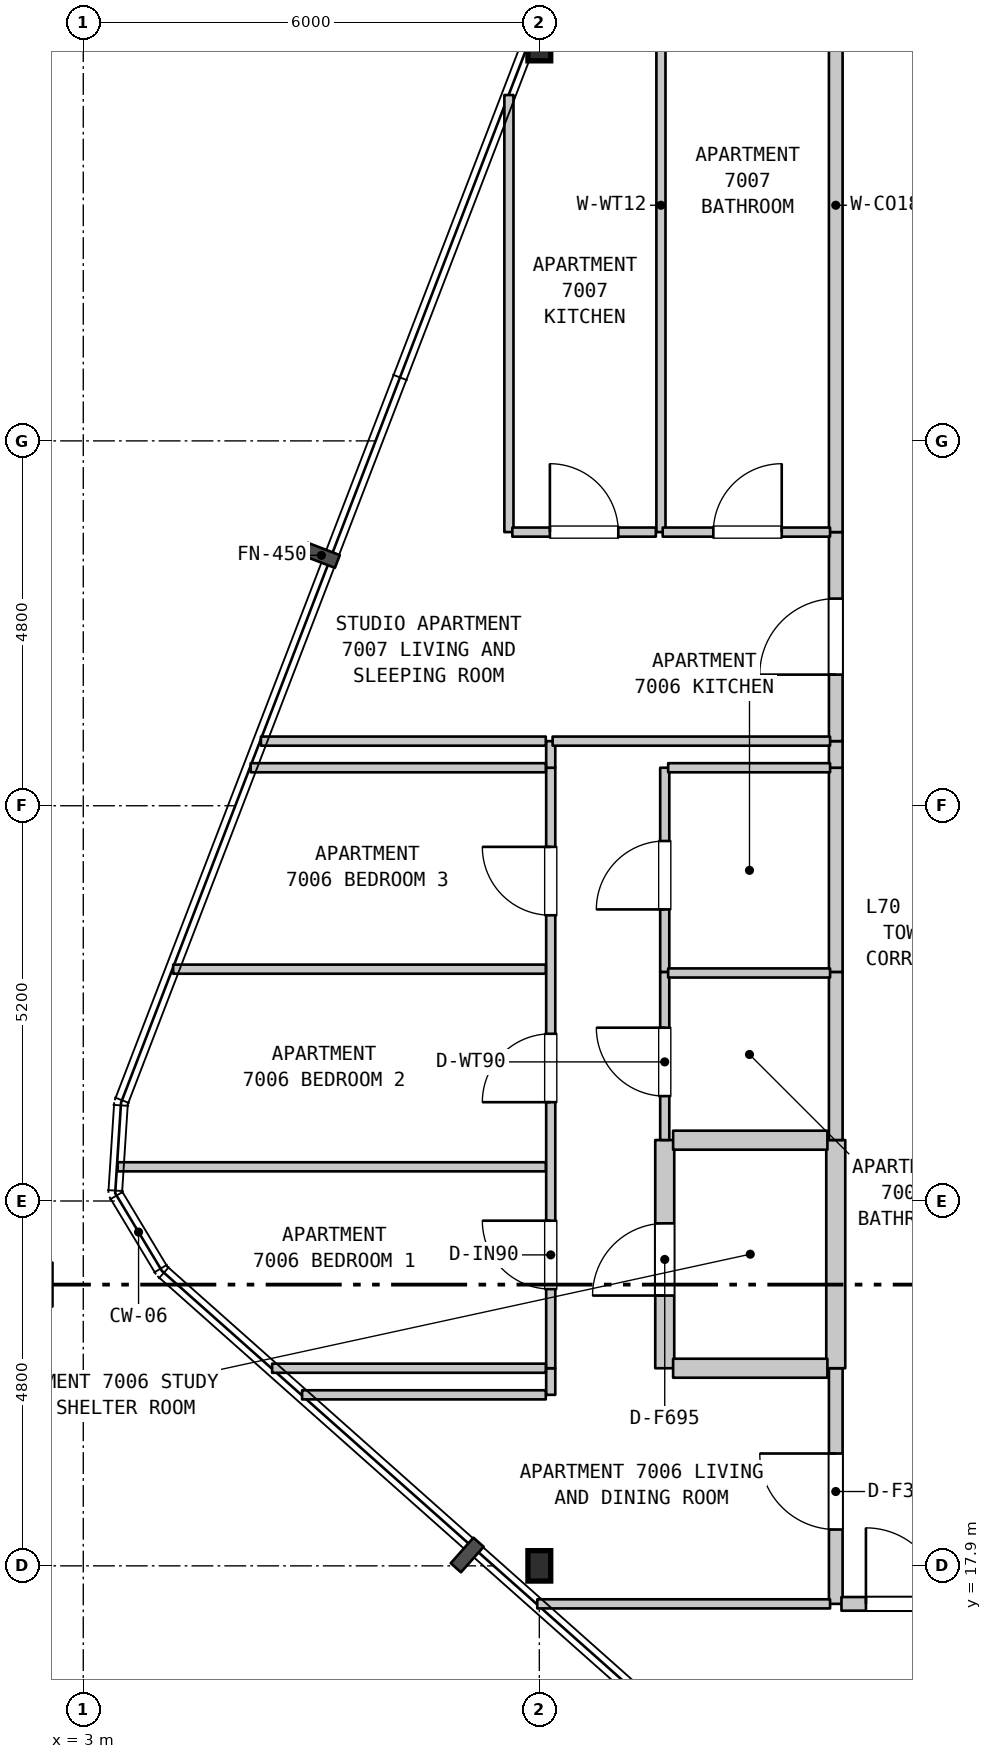
"""IFC4 building model, lengths in metres.
Left out: names, types, materials, properties, quantities, classifications, styles, units other than length and angle.
Written with IfcOpenShell. Run it as: python <this file> out.ifc"""

import sys

from ifc_helpers import new_model, si_unit, direction, frame, frame_2d, origin, origin_2d, place, context, subcontext, project, spatial, rectangle, i_section, extrude, element, fill, save


model = new_model("IFC4")
c1 = context("Model", 3, precision=1e-05, world=origin(), true_north=direction((0.0, 1.0)))
c2 = subcontext(c1, "Body", "Model", "MODEL_VIEW")
j1 = project(units=[si_unit("LENGTHUNIT", "METRE"), si_unit("PLANEANGLEUNIT", "RADIAN")], contexts=[c1])
p1 = place(None, origin())
s1 = spatial("IfcSite", under=j1, at=p1, CompositionType="ELEMENT")
p2 = place(p1, origin())
s2 = spatial("IfcBuilding", under=s1, at=p2, CompositionType="ELEMENT")
p3 = place(p2, frame((0.0, 0.0, 280.6)))
s3 = spatial("IfcBuildingStorey", under=s2, at=p3, CompositionType="ELEMENT", Elevation=280.6)
for number, where, z_axis, x_axis in (
    (1, (9.0, 17.9, 0.0), (0.0, 0.0, 1.0), (1.0, 0.0, 0.0)),
    (2, (9.0, 37.9, 0.0), (0.0, 0.0, 1.0), (1.0, 0.0, 0.0)),
):
    element("IfcColumn", number, at=place(p3, frame(where, z_axis=z_axis, x_axis=x_axis)), inside=s3, PredefinedType="COLUMN", context=c2, shape_type="SweptSolid", body=[
        extrude(i_section(OverallWidth=0.3, OverallDepth=0.4, WebThickness=0.013, FlangeThickness=0.024, FilletRadius=0.027, at=origin_2d()), origin(), (0.0, 0.0, 1.0), 3.7),
    ])
p4 = place(p3, frame((8.6, 31.5, 0.0), z_axis=(0.0, 0.0, 1.0), x_axis=(0.0, 1.0, 0.0)))
e3 = element("IfcWall", 3, at=p4, inside=s3, PredefinedType="PARTITIONING", context=c2, shape_type="SweptSolid", body=[
    extrude(rectangle(XDim=5.75, YDim=0.12, at=frame_2d((2.875, 0.0))), origin(), (0.0, 0.0, 1.0), 3.39),
])
p5 = place(p3, frame((9.15, 20.15, 0.0), z_axis=(0.0, 0.0, 1.0), x_axis=(0.0, 1.0, 0.0)))
e4 = element("IfcWall", 4, at=p5, inside=s3, PredefinedType="PARTITIONING", context=c2, shape_type="SweptSolid", body=[
    extrude(rectangle(XDim=0.35, YDim=0.12, at=frame_2d((0.175, 0.0))), origin(), (0.0, 0.0, 1.0), 3.39),
])
p6 = place(p3, frame((9.15, 20.5, 0.0), z_axis=(0.0, 0.0, 1.0), x_axis=(0.0, 1.0, 0.0)))
e5 = element("IfcWall", 5, at=p6, inside=s3, PredefinedType="PARTITIONING", context=c2, shape_type="SweptSolid", body=[
    extrude(rectangle(XDim=7.9, YDim=0.12, at=frame_2d((3.95, 0.0))), origin(), (0.0, 0.0, 1.0), 2.79),
])
p7 = place(p6, frame((1.041, 0.0, 0.0)))
e6 = element("IfcOpeningElement", 6, at=p7, cuts=e5, PredefinedType="OPENING", context=c2, shape_type="SweptSolid", body=[
    extrude(rectangle(XDim=0.9, YDim=2.15, at=frame_2d((0.45, 1.075))), frame((0.0, 0.07, 0.0), z_axis=(0.0, -1.0, 0.0), x_axis=(1.0, 0.0, 0.0)), (0.0, 0.0, 1.0), 0.14),
])
p8 = place(p6, frame((3.5, 0.0, 0.0)))
e7 = element("IfcOpeningElement", 7, at=p8, cuts=e5, PredefinedType="OPENING", context=c2, shape_type="SweptSolid", body=[
    extrude(rectangle(XDim=0.9, YDim=2.15, at=frame_2d((0.45, 1.075))), frame((0.0, 0.07, 0.0), z_axis=(0.0, -1.0, 0.0), x_axis=(1.0, 0.0, 0.0)), (0.0, 0.0, 1.0), 0.14),
])
p9 = place(p6, frame((5.959, 0.0, 0.0)))
e8 = element("IfcOpeningElement", 8, at=p9, cuts=e5, PredefinedType="OPENING", context=c2, shape_type="SweptSolid", body=[
    extrude(rectangle(XDim=0.9, YDim=2.15, at=frame_2d((0.45, 1.075))), frame((0.0, 0.07, 0.0), z_axis=(0.0, -1.0, 0.0), x_axis=(1.0, 0.0, 0.0)), (0.0, 0.0, 1.0), 0.14),
])
p10 = place(p3, frame((9.15, 28.4, 0.0), z_axis=(0.0, 0.0, 1.0), x_axis=(0.0, 1.0, 0.0)))
e9 = element("IfcWall", 9, at=p10, inside=s3, PredefinedType="PARTITIONING", context=c2, shape_type="SweptSolid", body=[
    extrude(rectangle(XDim=0.35, YDim=0.12, at=frame_2d((0.175, 0.0))), origin(), (0.0, 0.0, 1.0), 3.39),
])
p11 = place(p3, frame((10.6, 31.5, 0.0), z_axis=(0.0, 0.0, 1.0), x_axis=(0.0, 1.0, 0.0)))
e10 = element("IfcWall", 10, at=p11, inside=s3, PredefinedType="PARTITIONING", context=c2, shape_type="SweptSolid", body=[
    extrude(rectangle(XDim=8.6, YDim=0.12, at=frame_2d((4.3, 0.0))), origin(), (0.0, 0.0, 1.0), 3.39),
])
p12 = place(p3, frame((10.65, 20.5, 0.0), z_axis=(0.0, 0.0, 1.0), x_axis=(0.0, 1.0, 0.0)))
e11 = element("IfcWall", 11, at=p12, inside=s3, PredefinedType="STANDARD", context=c2, shape_type="SweptSolid", body=[
    extrude(rectangle(XDim=3.002, YDim=0.25, at=frame_2d((1.501, 0.0))), origin(), (0.0, 0.0, 1.0), 3.39),
])
p13 = place(p12, frame((0.956, 0.0, 0.0)))
e12 = element("IfcOpeningElement", 12, at=p13, cuts=e11, PredefinedType="OPENING", context=c2, shape_type="SweptSolid", body=[
    extrude(rectangle(XDim=0.95, YDim=2.15, at=frame_2d((0.475, 1.075))), frame((0.0, 0.135, 0.0), z_axis=(0.0, -1.0, 0.0), x_axis=(1.0, 0.0, 0.0)), (0.0, 0.0, 1.0), 0.27),
])
p14 = place(p3, frame((10.65, 23.502, 0.0), z_axis=(0.0, 0.0, 1.0), x_axis=(0.0, 1.0, 0.0)))
e13 = element("IfcWall", 13, at=p14, inside=s3, PredefinedType="PARTITIONING", context=c2, shape_type="SweptSolid", body=[
    extrude(rectangle(XDim=2.212, YDim=0.12, at=frame_2d((1.106, 0.0))), origin(), (0.0, 0.0, 1.0), 3.39),
])
p15 = place(p14, frame((0.578, 0.0, 0.0)))
e14 = element("IfcOpeningElement", 14, at=p15, cuts=e13, PredefinedType="OPENING", context=c2, shape_type="SweptSolid", body=[
    extrude(rectangle(XDim=0.9, YDim=2.1, at=frame_2d((0.45, 1.05))), frame((0.0, 0.07, 0.0), z_axis=(0.0, -1.0, 0.0), x_axis=(1.0, 0.0, 0.0)), (0.0, 0.0, 1.0), 0.14),
])
p16 = place(p3, frame((10.65, 25.714, 0.0), z_axis=(0.0, 0.0, 1.0), x_axis=(0.0, 1.0, 0.0)))
e15 = element("IfcWall", 15, at=p16, inside=s3, PredefinedType="PARTITIONING", context=c2, shape_type="SweptSolid", body=[
    extrude(rectangle(XDim=2.686, YDim=0.12, at=frame_2d((1.343, 0.0))), origin(), (0.0, 0.0, 1.0), 3.39),
])
p17 = place(p16, frame((0.822, 0.0, 0.0)))
e16 = element("IfcOpeningElement", 16, at=p17, cuts=e15, PredefinedType="OPENING", context=c2, shape_type="SweptSolid", body=[
    extrude(rectangle(XDim=0.9, YDim=2.15, at=frame_2d((0.45, 1.075))), frame((0.0, 0.07, 0.0), z_axis=(0.0, -1.0, 0.0), x_axis=(1.0, 0.0, 0.0)), (0.0, 0.0, 1.0), 0.14),
])
p18 = place(p3, frame((12.9, 17.4, 0.0), z_axis=(0.0, 0.0, 1.0), x_axis=(0.0, 1.0, 0.0)))
e17 = element("IfcWall", 17, at=p18, inside=s3, PredefinedType="STANDARD", context=c2, shape_type="SweptSolid", body=[
    extrude(rectangle(XDim=3.1, YDim=0.18, at=frame_2d((1.55, 0.0))), origin(), (0.0, 0.0, 1.0), 3.39),
])
p19 = place(p18, frame((0.978, 0.0, 0.0)))
e18 = element("IfcOpeningElement", 18, at=p19, cuts=e17, PredefinedType="OPENING", context=c2, shape_type="SweptSolid", body=[
    extrude(rectangle(XDim=1.0, YDim=2.15, at=frame_2d((0.5, 1.075))), frame((0.0, 0.1, 0.0), z_axis=(0.0, -1.0, 0.0), x_axis=(1.0, 0.0, 0.0)), (0.0, 0.0, 1.0), 0.2),
])
p20 = place(p3, frame((12.9, 20.5, 0.0), z_axis=(0.0, 0.0, 1.0), x_axis=(0.0, 1.0, 0.0)))
e19 = element("IfcWall", 19, at=p20, inside=s3, PredefinedType="STANDARD", context=c2, shape_type="SweptSolid", body=[
    extrude(rectangle(XDim=3.002, YDim=0.25, at=frame_2d((1.501, 0.0))), origin(), (0.0, 0.0, 1.0), 3.39),
])
p21 = place(p3, frame((12.9, 23.502, 0.0), z_axis=(0.0, 0.0, 1.0), x_axis=(0.0, 1.0, 0.0)))
e20 = element("IfcWall", 20, at=p21, inside=s3, PredefinedType="STANDARD", context=c2, shape_type="SweptSolid", body=[
    extrude(rectangle(XDim=2.212, YDim=0.18, at=frame_2d((1.106, 0.0))), origin(), (0.0, 0.0, 1.0), 3.39),
])
p22 = place(p3, frame((12.9, 25.714, 0.0), z_axis=(0.0, 0.0, 1.0), x_axis=(0.0, 1.0, 0.0)))
e21 = element("IfcWall", 21, at=p22, inside=s3, PredefinedType="STANDARD", context=c2, shape_type="SweptSolid", body=[
    extrude(rectangle(XDim=2.686, YDim=0.18, at=frame_2d((1.343, 0.0))), origin(), (0.0, 0.0, 1.0), 3.39),
])
p23 = place(p3, frame((12.9, 28.4, 0.0), z_axis=(0.0, 0.0, 1.0), x_axis=(0.0, 1.0, 0.0)))
e22 = element("IfcWall", 22, at=p23, inside=s3, PredefinedType="STANDARD", context=c2, shape_type="SweptSolid", body=[
    extrude(rectangle(XDim=0.35, YDim=0.18, at=frame_2d((0.175, 0.0))), origin(), (0.0, 0.0, 1.0), 3.39),
])
p24 = place(p3, frame((12.9, 28.75, 0.0), z_axis=(0.0, 0.0, 1.0), x_axis=(0.0, 1.0, 0.0)))
e23 = element("IfcWall", 23, at=p24, inside=s3, PredefinedType="STANDARD", context=c2, shape_type="SweptSolid", body=[
    extrude(rectangle(XDim=2.75, YDim=0.18, at=frame_2d((1.375, 0.0))), origin(), (0.0, 0.0, 1.0), 3.39),
])
p25 = place(p24, frame((0.875, 0.0, 0.0)))
e24 = element("IfcOpeningElement", 24, at=p25, cuts=e23, PredefinedType="OPENING", context=c2, shape_type="SweptSolid", body=[
    extrude(rectangle(XDim=1.0, YDim=2.15, at=frame_2d((0.5, 1.075))), frame((0.0, 0.1, 0.0), z_axis=(0.0, -1.0, 0.0), x_axis=(1.0, 0.0, 0.0)), (0.0, 0.0, 1.0), 0.2),
])
p26 = place(p3, frame((12.9, 31.5, 0.0), z_axis=(0.0, 0.0, 1.0), x_axis=(0.0, 1.0, 0.0)))
e25 = element("IfcWall", 25, at=p26, inside=s3, PredefinedType="STANDARD", context=c2, shape_type="SweptSolid", body=[
    extrude(rectangle(XDim=8.6, YDim=0.18, at=frame_2d((4.3, 0.0))), origin(), (0.0, 0.0, 1.0), 3.39),
])
p27 = place(p3, frame((8.973, 17.4, 0.0), z_axis=(0.0, 0.0, 1.0), x_axis=(1.0, 0.0, 0.0)))
e26 = element("IfcWall", 26, at=p27, inside=s3, PredefinedType="PARTITIONING", context=c2, shape_type="SweptSolid", body=[
    extrude(rectangle(XDim=3.852, YDim=0.12, at=frame_2d((1.926, 0.0))), origin(), (0.0, 0.0, 1.0), 3.39),
])
p28 = place(p3, frame((12.975, 17.4, 0.0), z_axis=(0.0, 0.0, 1.0), x_axis=(1.0, 0.0, 0.0)))
e27 = element("IfcWall", 27, at=p28, inside=s3, PredefinedType="STANDARD", context=c2, shape_type="SweptSolid", body=[
    extrude(rectangle(XDim=3.68, YDim=0.18, at=frame_2d((1.84, 0.0))), origin(), (0.0, 0.0, 1.0), 3.39),
])
p29 = place(p28, frame((0.322, 0.0, 0.0)))
e28 = element("IfcOpeningElement", 28, at=p29, cuts=e27, PredefinedType="OPENING", context=c2, shape_type="SweptSolid", body=[
    extrude(rectangle(XDim=1.0, YDim=2.15, at=frame_2d((0.5, 1.075))), frame((0.0, 0.1, 0.0), z_axis=(0.0, -1.0, 0.0), x_axis=(1.0, 0.0, 0.0)), (0.0, 0.0, 1.0), 0.2),
])
p30 = place(p3, frame((5.879, 20.15, 0.0), z_axis=(0.0, 0.0, 1.0), x_axis=(1.0, 0.0, 0.0)))
e29 = element("IfcWall", 29, at=p30, inside=s3, PredefinedType="PARTITIONING", context=c2, shape_type="SweptSolid", body=[
    extrude(rectangle(XDim=3.206, YDim=0.12, at=frame_2d((1.603, 0.0))), origin(), (0.0, 0.0, 1.0), 3.39),
])
p31 = place(p3, frame((5.485, 20.5, 0.0), z_axis=(0.0, 0.0, 1.0), x_axis=(1.0, 0.0, 0.0)))
e30 = element("IfcWall", 30, at=p31, inside=s3, PredefinedType="PARTITIONING", context=c2, shape_type="SweptSolid", body=[
    extrude(rectangle(XDim=3.6, YDim=0.12, at=frame_2d((1.8, 0.0))), origin(), (0.0, 0.0, 1.0), 3.39),
])
p32 = place(p3, frame((10.76, 20.5, 0.0), z_axis=(0.0, 0.0, 1.0), x_axis=(1.0, 0.0, 0.0)))
e31 = element("IfcWall", 31, at=p32, inside=s3, PredefinedType="STANDARD", context=c2, shape_type="SweptSolid", body=[
    extrude(rectangle(XDim=2.03, YDim=0.25, at=frame_2d((1.015, 0.0))), origin(), (0.0, 0.0, 1.0), 3.39),
])
p33 = place(p3, frame((3.452, 23.15, 0.0), z_axis=(0.0, 0.0, 1.0), x_axis=(1.0, 0.0, 0.0)))
e32 = element("IfcWall", 32, at=p33, inside=s3, PredefinedType="PARTITIONING", context=c2, shape_type="SweptSolid", body=[
    extrude(rectangle(XDim=5.633, YDim=0.12, at=frame_2d((2.816, 0.0))), origin(), (0.0, 0.0, 1.0), 3.39),
])
p34 = place(p3, frame((10.76, 23.5, 0.0), z_axis=(0.0, 0.0, 1.0), x_axis=(1.0, 0.0, 0.0)))
e33 = element("IfcWall", 33, at=p34, inside=s3, PredefinedType="STANDARD", context=c2, shape_type="SweptSolid", body=[
    extrude(rectangle(XDim=2.03, YDim=0.25, at=frame_2d((1.015, 0.0))), origin(), (0.0, 0.0, 1.0), 3.39),
])
p35 = place(p3, frame((10.695, 25.7, 0.0), z_axis=(0.0, 0.0, 1.0), x_axis=(1.0, 0.0, 0.0)))
e34 = element("IfcWall", 34, at=p35, inside=s3, PredefinedType="PARTITIONING", context=c2, shape_type="SweptSolid", body=[
    extrude(rectangle(XDim=2.13, YDim=0.12, at=frame_2d((1.065, 0.0))), origin(), (0.0, 0.0, 1.0), 3.39),
])
p36 = place(p3, frame((4.183, 25.75, 0.0), z_axis=(0.0, 0.0, 1.0), x_axis=(1.0, 0.0, 0.0)))
e35 = element("IfcWall", 35, at=p36, inside=s3, PredefinedType="PARTITIONING", context=c2, shape_type="SweptSolid", body=[
    extrude(rectangle(XDim=4.902, YDim=0.12, at=frame_2d((2.451, 0.0))), origin(), (0.0, 0.0, 1.0), 3.39),
])
p37 = place(p3, frame((5.202, 28.4, 0.0), z_axis=(0.0, 0.0, 1.0), x_axis=(1.0, 0.0, 0.0)))
e36 = element("IfcWall", 36, at=p37, inside=s3, PredefinedType="PARTITIONING", context=c2, shape_type="SweptSolid", body=[
    extrude(rectangle(XDim=3.883, YDim=0.12, at=frame_2d((1.941, 0.0))), origin(), (0.0, 0.0, 1.0), 3.39),
])
p38 = place(p3, frame((10.695, 28.4, 0.0), z_axis=(0.0, 0.0, 1.0), x_axis=(1.0, 0.0, 0.0)))
e37 = element("IfcWall", 37, at=p38, inside=s3, PredefinedType="PARTITIONING", context=c2, shape_type="SweptSolid", body=[
    extrude(rectangle(XDim=2.13, YDim=0.12, at=frame_2d((1.065, 0.0))), origin(), (0.0, 0.0, 1.0), 3.39),
])
p39 = place(p3, frame((5.337, 28.75, 0.0), z_axis=(0.0, 0.0, 1.0), x_axis=(1.0, 0.0, 0.0)))
e38 = element("IfcWall", 38, at=p39, inside=s3, PredefinedType="PARTITIONING", context=c2, shape_type="SweptSolid", body=[
    extrude(rectangle(XDim=3.748, YDim=0.12, at=frame_2d((1.874, 0.0))), origin(), (0.0, 0.0, 1.0), 3.39),
])
p40 = place(p3, frame((9.175, 28.75, 0.0), z_axis=(0.0, 0.0, 1.0), x_axis=(1.0, 0.0, 0.0)))
e39 = element("IfcWall", 39, at=p40, inside=s3, PredefinedType="PARTITIONING", context=c2, shape_type="SweptSolid", body=[
    extrude(rectangle(XDim=3.65, YDim=0.12, at=frame_2d((1.825, 0.0))), origin(), (0.0, 0.0, 1.0), 3.39),
])
p41 = place(p3, frame((8.645, 31.5, 0.0), z_axis=(0.0, 0.0, 1.0), x_axis=(1.0, 0.0, 0.0)))
e40 = element("IfcWall", 40, at=p41, inside=s3, PredefinedType="PARTITIONING", context=c2, shape_type="SweptSolid", body=[
    extrude(rectangle(XDim=1.888, YDim=0.12, at=frame_2d((0.944, 0.0))), origin(), (0.0, 0.0, 1.0), 3.39),
])
p42 = place(p41, frame((0.494, 0.0, 0.0)))
e41 = element("IfcOpeningElement", 41, at=p42, cuts=e40, PredefinedType="OPENING", context=c2, shape_type="SweptSolid", body=[
    extrude(rectangle(XDim=0.9, YDim=2.15, at=frame_2d((0.45, 1.075))), frame((0.0, 0.07, 0.0), z_axis=(0.0, -1.0, 0.0), x_axis=(1.0, 0.0, 0.0)), (0.0, 0.0, 1.0), 0.14),
])
p43 = place(p3, frame((10.623, 31.5, 0.0), z_axis=(0.0, 0.0, 1.0), x_axis=(1.0, 0.0, 0.0)))
e42 = element("IfcWall", 42, at=p43, inside=s3, PredefinedType="PARTITIONING", context=c2, shape_type="SweptSolid", body=[
    extrude(rectangle(XDim=2.202, YDim=0.12, at=frame_2d((1.101, 0.0))), origin(), (0.0, 0.0, 1.0), 3.39),
])
p44 = place(p43, frame((0.666, 0.0, 0.0)))
e43 = element("IfcOpeningElement", 43, at=p44, cuts=e42, PredefinedType="OPENING", context=c2, shape_type="SweptSolid", body=[
    extrude(rectangle(XDim=0.9, YDim=2.1, at=frame_2d((0.45, 1.05))), frame((0.0, 0.07, 0.0), z_axis=(0.0, -1.0, 0.0), x_axis=(1.0, 0.0, 0.0)), (0.0, 0.0, 1.0), 0.14),
])
p45 = place(p7, origin())
e44 = element("IfcDoor", 44, at=p45, inside=s3, OperationType="SINGLE_SWING_RIGHT", PredefinedType="DOOR", context=c2, shape_type="SweptSolid", body=[
    extrude(rectangle(XDim=0.9, YDim=2.15, at=frame_2d((0.45, 1.075))), frame((0.0, 0.025, 0.0), z_axis=(0.0, -1.0, 0.0), x_axis=(1.0, 0.0, 0.0)), (0.0, 0.0, 1.0), 0.05),
])
fill(e6, e44)
p46 = place(p8, origin())
e45 = element("IfcDoor", 45, at=p46, inside=s3, OperationType="SINGLE_SWING_LEFT", PredefinedType="DOOR", context=c2, shape_type="SweptSolid", body=[
    extrude(rectangle(XDim=0.9, YDim=2.15, at=frame_2d((0.45, 1.075))), frame((0.0, 0.025, 0.0), z_axis=(0.0, -1.0, 0.0), x_axis=(1.0, 0.0, 0.0)), (0.0, 0.0, 1.0), 0.05),
])
fill(e7, e45)
p47 = place(p9, origin())
e46 = element("IfcDoor", 46, at=p47, inside=s3, OperationType="SINGLE_SWING_RIGHT", PredefinedType="DOOR", context=c2, shape_type="SweptSolid", body=[
    extrude(rectangle(XDim=0.9, YDim=2.15, at=frame_2d((0.45, 1.075))), frame((0.0, 0.025, 0.0), z_axis=(0.0, -1.0, 0.0), x_axis=(1.0, 0.0, 0.0)), (0.0, 0.0, 1.0), 0.05),
])
fill(e8, e46)
p48 = place(p13, origin())
e47 = element("IfcDoor", 47, at=p48, inside=s3, OperationType="SINGLE_SWING_LEFT", PredefinedType="DOOR", context=c2, shape_type="SweptSolid", body=[
    extrude(rectangle(XDim=0.95, YDim=2.15, at=frame_2d((0.475, 1.075))), frame((0.0, 0.025, 0.0), z_axis=(0.0, -1.0, 0.0), x_axis=(1.0, 0.0, 0.0)), (0.0, 0.0, 1.0), 0.05),
])
fill(e12, e47)
p49 = place(p15, origin())
e48 = element("IfcDoor", 48, at=p49, inside=s3, OperationType="SINGLE_SWING_RIGHT", PredefinedType="DOOR", context=c2, shape_type="SweptSolid", body=[
    extrude(rectangle(XDim=0.9, YDim=2.1, at=frame_2d((0.45, 1.05))), frame((0.0, 0.025, 0.0), z_axis=(0.0, -1.0, 0.0), x_axis=(1.0, 0.0, 0.0)), (0.0, 0.0, 1.0), 0.05),
])
fill(e14, e48)
p50 = place(p17, origin())
e49 = element("IfcDoor", 49, at=p50, inside=s3, OperationType="SINGLE_SWING_LEFT", PredefinedType="DOOR", context=c2, shape_type="SweptSolid", body=[
    extrude(rectangle(XDim=0.9, YDim=2.15, at=frame_2d((0.45, 1.075))), frame((0.0, 0.025, 0.0), z_axis=(0.0, -1.0, 0.0), x_axis=(1.0, 0.0, 0.0)), (0.0, 0.0, 1.0), 0.05),
])
fill(e16, e49)
p51 = place(p19, origin())
e50 = element("IfcDoor", 50, at=p51, inside=s3, OperationType="SINGLE_SWING_RIGHT", PredefinedType="DOOR", context=c2, shape_type="SweptSolid", body=[
    extrude(rectangle(XDim=1.0, YDim=2.15, at=frame_2d((0.5, 1.075))), frame((0.0, 0.025, 0.0), z_axis=(0.0, -1.0, 0.0), x_axis=(1.0, 0.0, 0.0)), (0.0, 0.0, 1.0), 0.05),
])
fill(e18, e50)
p52 = place(p25, origin())
e51 = element("IfcDoor", 51, at=p52, inside=s3, OperationType="SINGLE_SWING_LEFT", PredefinedType="DOOR", context=c2, shape_type="SweptSolid", body=[
    extrude(rectangle(XDim=1.0, YDim=2.15, at=frame_2d((0.5, 1.075))), frame((0.0, 0.025, 0.0), z_axis=(0.0, -1.0, 0.0), x_axis=(1.0, 0.0, 0.0)), (0.0, 0.0, 1.0), 0.05),
])
fill(e24, e51)
p53 = place(p29, origin())
e52 = element("IfcDoor", 52, at=p53, inside=s3, OperationType="SINGLE_SWING_LEFT", PredefinedType="DOOR", context=c2, shape_type="SweptSolid", body=[
    extrude(rectangle(XDim=1.0, YDim=2.15, at=frame_2d((0.5, 1.075))), frame((0.0, 0.025, 0.0), z_axis=(0.0, -1.0, 0.0), x_axis=(1.0, 0.0, 0.0)), (0.0, 0.0, 1.0), 0.05),
])
fill(e28, e52)
p54 = place(p42, origin())
e53 = element("IfcDoor", 53, at=p54, inside=s3, OperationType="SINGLE_SWING_LEFT", PredefinedType="DOOR", context=c2, shape_type="SweptSolid", body=[
    extrude(rectangle(XDim=0.9, YDim=2.15, at=frame_2d((0.45, 1.075))), frame((0.0, 0.025, 0.0), z_axis=(0.0, -1.0, 0.0), x_axis=(1.0, 0.0, 0.0)), (0.0, 0.0, 1.0), 0.05),
])
fill(e41, e53)
p55 = place(p44, origin())
e54 = element("IfcDoor", 54, at=p55, inside=s3, OperationType="SINGLE_SWING_RIGHT", PredefinedType="DOOR", context=c2, shape_type="SweptSolid", body=[
    extrude(rectangle(XDim=0.9, YDim=2.1, at=frame_2d((0.45, 1.05))), frame((0.0, 0.025, 0.0), z_axis=(0.0, -1.0, 0.0), x_axis=(1.0, 0.0, 0.0)), (0.0, 0.0, 1.0), 0.05),
])
fill(e43, e54)
save(model, sys.argv[1])
